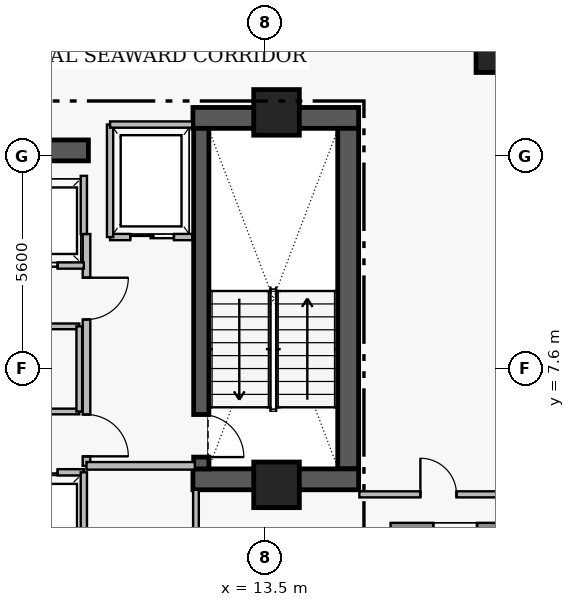
"""IFC4 building model, lengths in metres.
Left out: names, types, materials, properties, quantities, classifications, styles, units other than length and angle.
Written with IfcOpenShell. Run it as: python <this file> out.ifc"""

import sys

from ifc_helpers import new_model, si_unit, direction, frame, frame_2d, origin, origin_2d, place, context, subcontext, project, spatial, rectangle, extrude, element, fill, save


model = new_model("IFC4")
c1 = context("Model", 3, precision=1e-05, world=origin(), true_north=direction((0.0, 1.0)))
c2 = subcontext(c1, "Body", "Model", "MODEL_VIEW")
j1 = project(units=[si_unit("LENGTHUNIT", "METRE"), si_unit("PLANEANGLEUNIT", "RADIAN")], contexts=[c1])
p1 = place(None, origin())
s1 = spatial("IfcSite", under=j1, at=p1, CompositionType="ELEMENT")
p2 = place(p1, origin())
s2 = spatial("IfcBuilding", under=s1, at=p2, CompositionType="ELEMENT")
p3 = place(p2, frame((0.0, 0.0, 254.45)))
s3 = spatial("IfcBuildingStorey", under=s2, at=p3, CompositionType="ELEMENT", Elevation=254.45)
p4 = place(p3, frame((11.6, 14.205, 0.0), z_axis=(0.0, 0.0, 1.0), x_axis=(1.0, 0.0, 0.0)))
e1 = element("IfcWall", 1, at=p4, inside=s3, PredefinedType="SHEAR", context=c2, shape_type="SweptSolid", body=[
    extrude(rectangle(XDim=4.36, YDim=0.55, at=frame_2d((2.18, 0.0))), origin(), (0.0, 0.0, 1.0), 3.51),
])
p5 = place(p3, frame((15.685, 4.97, 0.0), z_axis=(0.0, 0.0, 1.0), x_axis=(0.0, 1.0, 0.0)))
e2 = element("IfcWall", 2, at=p5, inside=s3, PredefinedType="SHEAR", context=c2, shape_type="SweptSolid", body=[
    extrude(rectangle(XDim=8.96, YDim=0.55, at=frame_2d((4.48, 0.0))), origin(), (0.0, 0.0, 1.0), 3.51),
])
p6 = place(p3, frame((11.6, 4.695, 0.0), z_axis=(0.0, 0.0, 1.0), x_axis=(1.0, 0.0, 0.0)))
e3 = element("IfcWall", 3, at=p6, inside=s3, PredefinedType="SHEAR", context=c2, shape_type="SweptSolid", body=[
    extrude(rectangle(XDim=4.36, YDim=0.55, at=frame_2d((2.18, 0.0))), origin(), (0.0, 0.0, 1.0), 3.51),
])
p7 = place(p3, frame((1.25, 13.35, 0.0), z_axis=(0.0, 0.0, 1.0), x_axis=(1.0, 0.0, 0.0)))
e4 = element("IfcWall", 4, at=p7, inside=s3, PredefinedType="SHEAR", context=c2, shape_type="SweptSolid", body=[
    extrude(rectangle(XDim=7.6, YDim=0.55, at=frame_2d((3.8, 0.0))), origin(), (0.0, 0.0, 1.0), 3.48),
])
p8 = place(p3, frame((11.82, 13.93, 0.0), z_axis=(0.0, 0.0, 1.0), x_axis=(0.0, -1.0, 0.0)))
e5 = element("IfcWall", 5, at=p8, inside=s3, PredefinedType="SHEAR", context=c2, shape_type="SweptSolid", body=[
    extrude(rectangle(XDim=8.96, YDim=0.4, at=frame_2d((4.48, 0.0))), origin(), (0.0, 0.0, 1.0), 3.51),
])
p9 = place(p8, frame((7.53, 0.0, 0.0)))
e6 = element("IfcOpeningElement", 6, at=p9, cuts=e5, PredefinedType="OPENING", context=c2, shape_type="SweptSolid", body=[
    extrude(rectangle(XDim=1.12, YDim=2.22, at=frame_2d((0.56, 1.11))), frame((0.0, 0.21, 0.0), z_axis=(0.0, -1.0, 0.0), x_axis=(1.0, 0.0, 0.0)), (0.0, 0.0, 1.0), 0.42),
])
for number, where, z_axis, x_axis in (
    (7, (13.8, 14.35, 0.0), (0.0, 0.0, 1.0), (1.0, 0.0, 0.0)),
    (8, (13.8, 4.55, 0.0), (0.0, 0.0, 1.0), (1.0, 0.0, 0.0)),
):
    element("IfcColumn", number, at=place(p3, frame(where, z_axis=z_axis, x_axis=x_axis)), inside=s3, PredefinedType="COLUMN", context=c2, shape_type="SweptSolid", body=[
        extrude(rectangle(XDim=1.2, YDim=1.2, at=origin_2d()), origin(), (0.0, 0.0, 1.0), 3.7),
    ])
p10 = place(p3, frame((19.55, 15.9, 0.0), z_axis=(0.0, 0.0, 1.0), x_axis=(1.0, 0.0, 0.0)))
e9 = element("IfcColumn", 9, at=p10, inside=s3, PredefinedType="COLUMN", context=c2, shape_type="SweptSolid", body=[
    extrude(rectangle(XDim=1.0, YDim=1.0, at=origin_2d()), origin(), (0.0, 0.0, 1.0), 3.7),
])
p11 = place(p3, frame((20.2, 3.4, 0.0), z_axis=(0.0, 0.0, 1.0), x_axis=(-1.0, 0.0, 0.0)))
e10 = element("IfcWall", 10, at=p11, inside=s3, PredefinedType="STANDARD", context=c2, shape_type="SweptSolid", body=[
    extrude(rectangle(XDim=3.4, YDim=0.3, at=frame_2d((1.7, 0.0))), origin(), (0.0, 0.0, 1.0), 3.48),
])
p12 = place(p11, frame((1.125, 0.0, 1.25)))
e11 = element("IfcOpeningElement", 11, at=p12, cuts=e10, PredefinedType="OPENING", context=c2, shape_type="SweptSolid", body=[
    extrude(rectangle(XDim=1.15, YDim=1.55, at=frame_2d((0.575, 0.775))), frame((0.0, 0.16, 0.0), z_axis=(0.0, -1.0, 0.0), x_axis=(1.0, 0.0, 0.0)), (0.0, 0.0, 1.0), 0.32),
])
p13 = place(p3, frame((8.8, 11.15, 0.0), z_axis=(0.0, 0.0, 1.0), x_axis=(0.0, -1.0, 0.0)))
e12 = element("IfcWall", 12, at=p13, inside=s3, PredefinedType="PARTITIONING", context=c2, shape_type="SweptSolid", body=[
    extrude(rectangle(XDim=6.1, YDim=0.2, at=frame_2d((3.05, 0.0))), origin(), (0.0, 0.0, 1.0), 3.48),
])
p14 = place(p13, frame((1.15, 0.0, 0.0)))
e13 = element("IfcOpeningElement", 13, at=p14, cuts=e12, PredefinedType="OPENING", context=c2, shape_type="SweptSolid", body=[
    extrude(rectangle(XDim=1.1, YDim=2.2, at=frame_2d((0.55, 1.1))), frame((0.0, 0.11, 0.0), z_axis=(0.0, -1.0, 0.0), x_axis=(1.0, 0.0, 0.0)), (0.0, 0.0, 1.0), 0.22),
])
p15 = place(p13, frame((4.75, 0.0, 0.0)))
e14 = element("IfcOpeningElement", 14, at=p15, cuts=e12, PredefinedType="OPENING", context=c2, shape_type="SweptSolid", body=[
    extrude(rectangle(XDim=1.1, YDim=2.2, at=frame_2d((0.55, 1.1))), frame((0.0, 0.11, 0.0), z_axis=(0.0, -1.0, 0.0), x_axis=(1.0, 0.0, 0.0)), (0.0, 0.0, 1.0), 0.22),
])
p16 = place(p3, frame((9.42, 11.07, 0.0), z_axis=(0.0, 0.0, 1.0), x_axis=(1.0, 0.0, 0.0)))
e15 = element("IfcWall", 15, at=p16, inside=s3, PredefinedType="PARTITIONING", context=c2, shape_type="SweptSolid", body=[
    extrude(rectangle(XDim=2.16, YDim=0.165, at=frame_2d((1.08, 0.0))), origin(), (0.0, 0.0, 1.0), 3.48),
])
p17 = place(p16, frame((0.53, 0.0, 0.0)))
e16 = element("IfcOpeningElement", 16, at=p17, cuts=e15, PredefinedType="OPENING", context=c2, shape_type="SweptSolid", body=[
    extrude(rectangle(XDim=1.15, YDim=2.25, at=frame_2d((0.575, 1.125))), frame((0.0, 0.093, 0.0), z_axis=(0.0, -1.0, 0.0), x_axis=(1.0, 0.0, 0.0)), (0.0, 0.0, 1.0), 0.185),
])
p18 = place(p3, frame((6.25, 4.88, 0.0), z_axis=(0.0, 0.0, 1.0), x_axis=(1.0, 0.0, 0.0)))
e17 = element("IfcWall", 17, at=p18, inside=s3, PredefinedType="PARTITIONING", context=c2, shape_type="SweptSolid", body=[
    extrude(rectangle(XDim=2.48, YDim=0.165, at=frame_2d((1.24, 0.0))), origin(), (0.0, 0.0, 1.0), 3.48),
])
p19 = place(p18, frame((0.69, 0.0, 0.0)))
e18 = element("IfcOpeningElement", 18, at=p19, cuts=e17, PredefinedType="OPENING", context=c2, shape_type="SweptSolid", body=[
    extrude(rectangle(XDim=1.1, YDim=2.25, at=frame_2d((0.55, 1.125))), frame((0.0, 0.093, 0.0), z_axis=(0.0, -1.0, 0.0), x_axis=(1.0, 0.0, 0.0)), (0.0, 0.0, 1.0), 0.185),
])
p20 = place(p3, frame((6.25, 10.32, 0.0), z_axis=(0.0, 0.0, 1.0), x_axis=(1.0, 0.0, 0.0)))
e19 = element("IfcWall", 19, at=p20, inside=s3, PredefinedType="PARTITIONING", context=c2, shape_type="SweptSolid", body=[
    extrude(rectangle(XDim=2.48, YDim=0.165, at=frame_2d((1.24, 0.0))), origin(), (0.0, 0.0, 1.0), 3.48),
])
p21 = place(p20, frame((0.69, 0.0, 0.0)))
e20 = element("IfcOpeningElement", 20, at=p21, cuts=e19, PredefinedType="OPENING", context=c2, shape_type="SweptSolid", body=[
    extrude(rectangle(XDim=1.1, YDim=2.25, at=frame_2d((0.55, 1.125))), frame((0.0, 0.093, 0.0), z_axis=(0.0, -1.0, 0.0), x_axis=(1.0, 0.0, 0.0)), (0.0, 0.0, 1.0), 0.185),
])
p22 = place(p3, frame((6.14, 8.72, 0.0), z_axis=(0.0, 0.0, 1.0), x_axis=(1.0, 0.0, 0.0)))
e21 = element("IfcWall", 21, at=p22, inside=s3, PredefinedType="PARTITIONING", context=c2, shape_type="SweptSolid", body=[
    extrude(rectangle(XDim=2.47, YDim=0.15, at=frame_2d((1.235, 0.0))), origin(), (0.0, 0.0, 1.0), 3.48),
])
p23 = place(p22, frame((0.785, 0.0, 0.0)))
e22 = element("IfcOpeningElement", 22, at=p23, cuts=e21, PredefinedType="OPENING", context=c2, shape_type="SweptSolid", body=[
    extrude(rectangle(XDim=0.9, YDim=2.15, at=frame_2d((0.45, 1.075))), frame((0.0, 0.085, 0.0), z_axis=(0.0, -1.0, 0.0), x_axis=(1.0, 0.0, 0.0)), (0.0, 0.0, 1.0), 0.17),
])
p24 = place(p3, frame((15.98, 4.3, 0.0), z_axis=(0.0, 0.0, 1.0), x_axis=(1.0, 0.0, 0.0)))
e23 = element("IfcWall", 23, at=p24, inside=s3, PredefinedType="PARTITIONING", context=c2, shape_type="SweptSolid", body=[
    extrude(rectangle(XDim=4.16, YDim=0.16, at=frame_2d((2.08, 0.0))), origin(), (0.0, 0.0, 1.0), 3.48),
])
p25 = place(p24, frame((1.605, 0.0, 0.0)))
e24 = element("IfcOpeningElement", 24, at=p25, cuts=e23, PredefinedType="OPENING", context=c2, shape_type="SweptSolid", body=[
    extrude(rectangle(XDim=0.95, YDim=2.15, at=frame_2d((0.475, 1.075))), frame((0.0, 0.09, 0.0), z_axis=(0.0, -1.0, 0.0), x_axis=(1.0, 0.0, 0.0)), (0.0, 0.0, 1.0), 0.18),
])
p26 = place(p3, frame((8.8, 5.05, 0.0), z_axis=(0.0, 0.0, 1.0), x_axis=(1.0, 0.0, 0.0)))
e25 = element("IfcWall", 25, at=p26, inside=s3, PredefinedType="PARTITIONING", context=c2, shape_type="SweptSolid", body=[
    extrude(rectangle(XDim=2.85, YDim=0.2, at=frame_2d((1.425, 0.0))), origin(), (0.0, 0.0, 1.0), 3.48),
])
p27 = place(p3, frame((9.42, 11.07, 0.0), z_axis=(0.0, 0.0, 1.0), x_axis=(0.0, 1.0, 0.0)))
e26 = element("IfcWall", 26, at=p27, inside=s3, PredefinedType="PARTITIONING", context=c2, shape_type="SweptSolid", body=[
    extrude(rectangle(XDim=2.96, YDim=0.165, at=frame_2d((1.48, 0.0))), origin(), (0.0, 0.0, 1.0), 3.48),
])
p28 = place(p3, frame((9.42, 14.03, 0.0), z_axis=(0.0, 0.0, 1.0), x_axis=(1.0, 0.0, 0.0)))
e27 = element("IfcWall", 27, at=p28, inside=s3, PredefinedType="PARTITIONING", context=c2, shape_type="SweptSolid", body=[
    extrude(rectangle(XDim=2.16, YDim=0.165, at=frame_2d((1.08, 0.0))), origin(), (0.0, 0.0, 1.0), 3.48),
])
p29 = place(p3, frame((8.73, 2.52, 0.0), z_axis=(0.0, 0.0, 1.0), x_axis=(0.0, 1.0, 0.0)))
e28 = element("IfcWall", 28, at=p29, inside=s3, PredefinedType="PARTITIONING", context=c2, shape_type="SweptSolid", body=[
    extrude(rectangle(XDim=2.36, YDim=0.165, at=frame_2d((1.18, 0.0))), origin(), (0.0, 0.0, 1.0), 3.48),
])
p30 = place(p3, frame((8.73, 11.15, 0.0), z_axis=(0.0, 0.0, 1.0), x_axis=(0.0, 1.0, 0.0)))
e29 = element("IfcWall", 29, at=p30, inside=s3, PredefinedType="PARTITIONING", context=c2, shape_type="SweptSolid", body=[
    extrude(rectangle(XDim=1.53, YDim=0.165, at=frame_2d((0.765, 0.0))), origin(), (0.0, 0.0, 1.0), 3.48),
])
p31 = place(p3, frame((6.14, 6.48, 0.0), z_axis=(0.0, 0.0, 1.0), x_axis=(1.0, 0.0, 0.0)))
e30 = element("IfcWall", 30, at=p31, inside=s3, PredefinedType="PARTITIONING", context=c2, shape_type="SweptSolid", body=[
    extrude(rectangle(XDim=2.47, YDim=0.15, at=frame_2d((1.235, 0.0))), origin(), (0.0, 0.0, 1.0), 3.48),
])
p32 = place(p3, frame((8.61, 6.48, 0.0), z_axis=(0.0, 0.0, 1.0), x_axis=(0.0, 1.0, 0.0)))
e31 = element("IfcWall", 31, at=p32, inside=s3, PredefinedType="PARTITIONING", context=c2, shape_type="SweptSolid", body=[
    extrude(rectangle(XDim=2.24, YDim=0.15, at=frame_2d((1.12, 0.0))), origin(), (0.0, 0.0, 1.0), 3.48),
])
p33 = place(p3, frame((11.68, 1.72, 0.0), z_axis=(0.0, 0.0, 1.0), x_axis=(0.0, 1.0, 0.0)))
e32 = element("IfcWall", 32, at=p33, inside=s3, PredefinedType="PARTITIONING", context=c2, shape_type="SweptSolid", body=[
    extrude(rectangle(XDim=2.7, YDim=0.15, at=frame_2d((1.35, 0.0))), origin(), (0.0, 0.0, 1.0), 3.48),
])
p34 = place(p12, origin())
e33 = element("IfcWindow", 33, at=p34, inside=s3, PartitioningType="SINGLE_PANEL", PredefinedType="WINDOW", context=c2, shape_type="SweptSolid", body=[
    extrude(rectangle(XDim=1.15, YDim=1.55, at=frame_2d((0.575, 0.775))), frame((0.0, 0.03, 0.0), z_axis=(0.0, -1.0, 0.0), x_axis=(1.0, 0.0, 0.0)), (0.0, 0.0, 1.0), 0.06),
])
fill(e11, e33)
p35 = place(p9, origin())
e34 = element("IfcDoor", 34, at=p35, inside=s3, OperationType="SINGLE_SWING_RIGHT", PredefinedType="DOOR", context=c2, shape_type="SweptSolid", body=[
    extrude(rectangle(XDim=1.12, YDim=2.22, at=frame_2d((0.56, 1.11))), frame((0.0, 0.025, 0.0), z_axis=(0.0, -1.0, 0.0), x_axis=(1.0, 0.0, 0.0)), (0.0, 0.0, 1.0), 0.05),
])
fill(e6, e34)
p36 = place(p14, origin())
e35 = element("IfcDoor", 35, at=p36, inside=s3, OperationType="SINGLE_SWING_LEFT", PredefinedType="DOOR", context=c2, shape_type="SweptSolid", body=[
    extrude(rectangle(XDim=1.1, YDim=2.2, at=frame_2d((0.55, 1.1))), frame((0.0, 0.025, 0.0), z_axis=(0.0, -1.0, 0.0), x_axis=(1.0, 0.0, 0.0)), (0.0, 0.0, 1.0), 0.05),
])
fill(e13, e35)
p37 = place(p15, origin())
e36 = element("IfcDoor", 36, at=p37, inside=s3, OperationType="SINGLE_SWING_RIGHT", PredefinedType="DOOR", context=c2, shape_type="SweptSolid", body=[
    extrude(rectangle(XDim=1.1, YDim=2.2, at=frame_2d((0.55, 1.1))), frame((0.0, 0.025, 0.0), z_axis=(0.0, -1.0, 0.0), x_axis=(1.0, 0.0, 0.0)), (0.0, 0.0, 1.0), 0.05),
])
fill(e14, e36)
p38 = place(p17, origin())
e37 = element("IfcDoor", 37, at=p38, inside=s3, OperationType="SLIDING_TO_LEFT", PredefinedType="DOOR", context=c2, shape_type="SweptSolid", body=[
    extrude(rectangle(XDim=1.15, YDim=2.25, at=frame_2d((0.575, 1.125))), frame((0.0, 0.025, 0.0), z_axis=(0.0, -1.0, 0.0), x_axis=(1.0, 0.0, 0.0)), (0.0, 0.0, 1.0), 0.05),
])
fill(e16, e37)
p39 = place(p19, origin())
e38 = element("IfcDoor", 38, at=p39, inside=s3, OperationType="SLIDING_TO_LEFT", PredefinedType="DOOR", context=c2, shape_type="SweptSolid", body=[
    extrude(rectangle(XDim=1.1, YDim=2.25, at=frame_2d((0.55, 1.125))), frame((0.0, 0.025, 0.0), z_axis=(0.0, -1.0, 0.0), x_axis=(1.0, 0.0, 0.0)), (0.0, 0.0, 1.0), 0.05),
])
fill(e18, e38)
p40 = place(p21, origin())
e39 = element("IfcDoor", 39, at=p40, inside=s3, OperationType="SLIDING_TO_LEFT", PredefinedType="DOOR", context=c2, shape_type="SweptSolid", body=[
    extrude(rectangle(XDim=1.1, YDim=2.25, at=frame_2d((0.55, 1.125))), frame((0.0, 0.025, 0.0), z_axis=(0.0, -1.0, 0.0), x_axis=(1.0, 0.0, 0.0)), (0.0, 0.0, 1.0), 0.05),
])
fill(e20, e39)
p41 = place(p25, origin())
e40 = element("IfcDoor", 40, at=p41, inside=s3, OperationType="SINGLE_SWING_LEFT", PredefinedType="DOOR", context=c2, shape_type="SweptSolid", body=[
    extrude(rectangle(XDim=0.95, YDim=2.15, at=frame_2d((0.475, 1.075))), frame((0.0, 0.025, 0.0), z_axis=(0.0, -1.0, 0.0), x_axis=(1.0, 0.0, 0.0)), (0.0, 0.0, 1.0), 0.05),
])
fill(e24, e40)
save(model, sys.argv[1])
